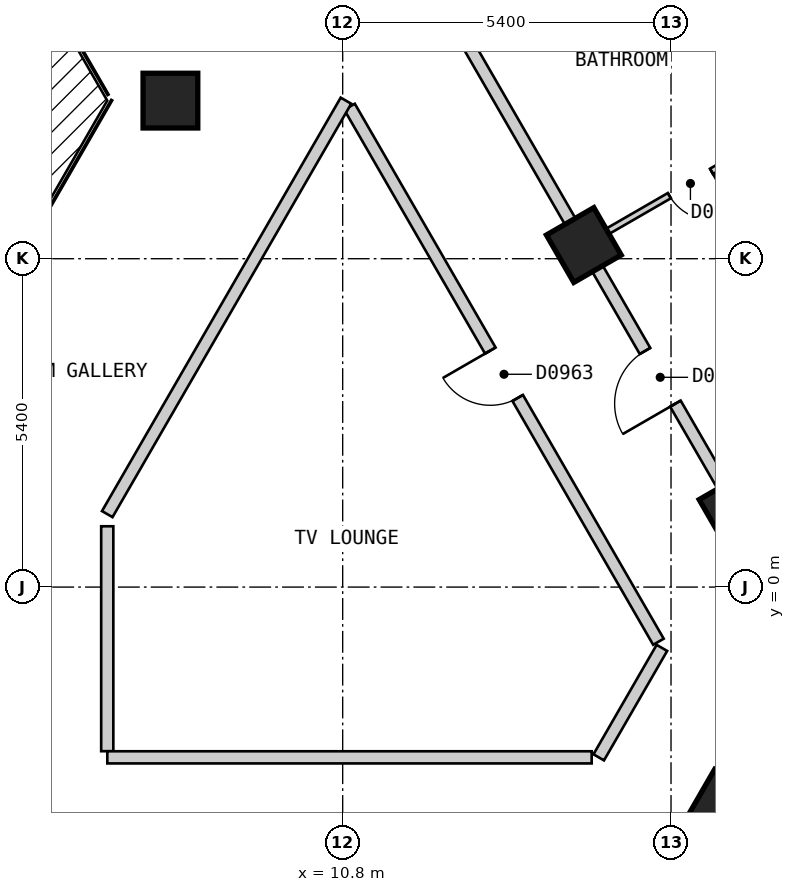
"""IFC4 building model, lengths in metres.
Left out: names, types, materials, properties, quantities, classifications, styles, units other than length and angle.
Written with IfcOpenShell. Run it as: python <this file> out.ifc"""

import sys

from ifc_helpers import new_model, si_unit, direction, frame, frame_2d, origin, origin_2d, place, context, subcontext, project, spatial, polyline, rectangle, outline, extrude, element, fill, save


model = new_model("IFC4")
c1 = context("Model", 3, precision=1e-05, world=origin(), true_north=direction((0.0, 1.0)))
c2 = subcontext(c1, "Body", "Model", "MODEL_VIEW")
j1 = project(units=[si_unit("LENGTHUNIT", "METRE"), si_unit("PLANEANGLEUNIT", "RADIAN")], contexts=[c1])
p1 = place(None, origin())
s1 = spatial("IfcSite", under=j1, at=p1, CompositionType="ELEMENT")
p2 = place(p1, origin())
s2 = spatial("IfcBuilding", under=s1, at=p2, CompositionType="ELEMENT")
p3 = place(p2, frame((0.0, 0.0, 90.0)))
s3 = spatial("IfcBuildingStorey", under=s2, at=p3, CompositionType="ELEMENT", Elevation=90.0)
for number, where, z_axis, x_axis in (
    (1, (17.083, -3.612, 0.0), (0.0, 0.0, 1.0), (0.5, 0.866, 0.0)),
    (2, (17.278, 1.274, 0.0), (0.0, 0.0, 1.0), (-0.5, 0.866, 0.0)),
    (3, (14.766, 5.625, 0.0), (0.0, 0.0, 1.0), (-0.5, 0.866, 0.0)),
    (4, (7.967, 8.0, 0.0), (0.0, 0.0, 1.0), (1.0, 0.0, 0.0)),
):
    element("IfcColumn", number, at=place(p3, frame(where, z_axis=z_axis, x_axis=x_axis)), inside=s3, PredefinedType="COLUMN", context=c2, shape_type="SweptSolid", body=[
        extrude(rectangle(XDim=0.9, YDim=0.9, at=origin_2d()), origin(), (0.0, 0.0, 1.0), 3.0),
    ])
p4 = place(p3, frame((29.027, 1.425, 0.0), z_axis=(0.0, 0.0, 1.0), x_axis=(-0.500027479704, 0.866009537788, 0.0)))
e5 = element("IfcWall", 5, at=p4, inside=s3, PredefinedType="SOLIDWALL", context=c2, shape_type="SweptSolid", body=[
    extrude(outline(polyline([(0.0, -0.15), (26.559, -0.15), (26.478, 0.15), (0.08, 0.15), (0.0, -0.15)])), origin(), (0.0, 0.0, 1.0), 2.7),
])
p5 = place(p4, frame((2.483, 0.0, 0.15)))
e6 = element("IfcOpeningElement", 6, at=p5, cuts=e5, PredefinedType="OPENING", context=c2, shape_type="SweptSolid", body=[
    extrude(rectangle(XDim=1.5, YDim=2.1, at=frame_2d((0.75, 1.05))), frame((0.0, 0.16, 0.0), z_axis=(0.0, -1.0, 0.0), x_axis=(1.0, 0.0, 0.0)), (0.0, 0.0, 1.0), 0.32),
])
p6 = place(p4, frame((7.506, 0.0, 0.15)))
e7 = element("IfcOpeningElement", 7, at=p6, cuts=e5, PredefinedType="OPENING", context=c2, shape_type="SweptSolid", body=[
    extrude(rectangle(XDim=1.5, YDim=2.1, at=frame_2d((0.75, 1.05))), frame((0.0, 0.16, 0.0), z_axis=(0.0, -1.0, 0.0), x_axis=(1.0, 0.0, 0.0)), (0.0, 0.0, 1.0), 0.32),
])
p7 = place(p4, frame((12.529, 0.0, 0.15)))
e8 = element("IfcOpeningElement", 8, at=p7, cuts=e5, PredefinedType="OPENING", context=c2, shape_type="SweptSolid", body=[
    extrude(rectangle(XDim=1.5, YDim=2.1, at=frame_2d((0.75, 1.05))), frame((0.0, 0.16, 0.0), z_axis=(0.0, -1.0, 0.0), x_axis=(1.0, 0.0, 0.0)), (0.0, 0.0, 1.0), 0.32),
])
p8 = place(p4, frame((17.552, 0.0, 0.15)))
e9 = element("IfcOpeningElement", 9, at=p8, cuts=e5, PredefinedType="OPENING", context=c2, shape_type="SweptSolid", body=[
    extrude(rectangle(XDim=1.5, YDim=2.1, at=frame_2d((0.75, 1.05))), frame((0.0, 0.16, 0.0), z_axis=(0.0, -1.0, 0.0), x_axis=(1.0, 0.0, 0.0)), (0.0, 0.0, 1.0), 0.32),
])
p9 = place(p4, frame((22.575, 0.0, 0.15)))
e10 = element("IfcOpeningElement", 10, at=p9, cuts=e5, PredefinedType="OPENING", context=c2, shape_type="SweptSolid", body=[
    extrude(rectangle(XDim=1.5, YDim=2.1, at=frame_2d((0.75, 1.05))), frame((0.0, 0.16, 0.0), z_axis=(0.0, -1.0, 0.0), x_axis=(1.0, 0.0, 0.0)), (0.0, 0.0, 1.0), 0.32),
])
p10 = place(p3, frame((10.913, 7.899, 0.0), z_axis=(0.0, 0.0, 1.0), x_axis=(0.500028940566, -0.866008694296, 0.0)))
e11 = element("IfcWall", 11, at=p10, inside=s3, PredefinedType="PARTITIONING", context=c2, shape_type="SweptSolid", body=[
    extrude(rectangle(XDim=10.159, YDim=0.2, at=frame_2d((5.08, 0.0))), origin(), (0.0, 0.0, 1.0), 2.7),
])
p11 = place(p10, frame((4.63, 0.0, 0.0)))
e12 = element("IfcOpeningElement", 12, at=p11, cuts=e11, PredefinedType="OPENING", context=c2, shape_type="SweptSolid", body=[
    extrude(rectangle(XDim=0.9, YDim=2.1, at=frame_2d((0.45, 1.05))), frame((0.0, 0.11, 0.0), z_axis=(0.0, -1.0, 0.0), x_axis=(1.0, 0.0, 0.0)), (0.0, 0.0, 1.0), 0.22),
])
p12 = place(p3, frame((8.488, 16.5, 0.0), z_axis=(0.0, 0.0, 1.0), x_axis=(0.499986836607, -0.86603300354, 0.0)))
e13 = element("IfcWall", 13, at=p12, inside=s3, PredefinedType="PARTITIONING", context=c2, shape_type="SweptSolid", body=[
    extrude(rectangle(XDim=20.09, YDim=0.2, at=frame_2d((10.045, 0.0))), origin(), (0.0, 0.0, 1.0), 2.7),
])
p13 = place(p12, frame((14.569, 0.0, 0.0)))
e14 = element("IfcOpeningElement", 14, at=p13, cuts=e13, PredefinedType="OPENING", context=c2, shape_type="SweptSolid", body=[
    extrude(rectangle(XDim=1.0, YDim=2.1, at=frame_2d((0.5, 1.05))), frame((0.0, 0.11, 0.0), z_axis=(0.0, -1.0, 0.0), x_axis=(1.0, 0.0, 0.0)), (0.0, 0.0, 1.0), 0.22),
])
p14 = place(p12, frame((4.547, 0.0, 0.0)))
e15 = element("IfcOpeningElement", 15, at=p14, cuts=e13, PredefinedType="OPENING", context=c2, shape_type="SweptSolid", body=[
    extrude(rectangle(XDim=1.0, YDim=2.1, at=frame_2d((0.5, 1.05))), frame((0.0, 0.11, 0.0), z_axis=(0.0, -1.0, 0.0), x_axis=(1.0, 0.0, 0.0)), (0.0, 0.0, 1.0), 0.22),
])
p15 = place(p3, frame((6.928, 1.0, 0.0), z_axis=(0.0, 0.0, 1.0), x_axis=(0.0, -1.0, 0.0)))
e16 = element("IfcWall", 16, at=p15, inside=s3, PredefinedType="PARTITIONING", context=c2, shape_type="SweptSolid", body=[
    extrude(rectangle(XDim=3.699, YDim=0.2, at=frame_2d((1.85, 0.0))), origin(), (0.0, 0.0, 1.0), 2.7),
])
p16 = place(p3, frame((6.929, -2.8, 0.0), z_axis=(0.0, 0.0, 1.0), x_axis=(1.0, 0.0, 0.0)))
e17 = element("IfcWall", 17, at=p16, inside=s3, PredefinedType="PARTITIONING", context=c2, shape_type="SweptSolid", body=[
    extrude(rectangle(XDim=7.966, YDim=0.2, at=frame_2d((3.983, 0.0))), origin(), (0.0, 0.0, 1.0), 2.7),
])
p17 = place(p3, frame((6.928, 1.2, 0.0), z_axis=(0.0, 0.0, 1.0), x_axis=(0.500055327065, 0.865993458332, 0.0)))
e18 = element("IfcWall", 18, at=p17, inside=s3, PredefinedType="PARTITIONING", context=c2, shape_type="SweptSolid", body=[
    extrude(rectangle(XDim=7.851, YDim=0.2, at=frame_2d((3.926, 0.0))), origin(), (0.0, 0.0, 1.0), 2.7),
])
p18 = place(p3, frame((15.011, -2.8, 0.0), z_axis=(0.0, 0.0, 1.0), x_axis=(0.499929208183, 0.866066271601, 0.0)))
e19 = element("IfcWall", 19, at=p18, inside=s3, PredefinedType="PARTITIONING", context=c2, shape_type="SweptSolid", body=[
    extrude(rectangle(XDim=2.078, YDim=0.2, at=frame_2d((1.039, 0.0))), origin(), (0.0, 0.0, 1.0), 2.7),
])
p19 = place(p3, frame((15.771, -5.884, 0.0), z_axis=(0.0, 0.0, 1.0), x_axis=(0.499939494019, 0.866060334111, 0.0)))
e20 = element("IfcWall", 20, at=p19, inside=s3, PredefinedType="PARTITIONING", context=c2, shape_type="SweptSolid", body=[
    extrude(rectangle(XDim=5.583, YDim=0.2, at=frame_2d((2.792, 0.0))), origin(), (0.0, 0.0, 1.0), 2.7),
])
p20 = place(p3, frame((14.853, 5.675, 0.0), z_axis=(0.0, 0.0, 1.0), x_axis=(0.865979019114, 0.500080332001, 0.0)))
e21 = element("IfcWall", 21, at=p20, inside=s3, PredefinedType="PARTITIONING", context=c2, shape_type="SweptSolid", body=[
    extrude(rectangle(XDim=3.897, YDim=0.1, at=frame_2d((1.949, 0.0))), origin(), (0.0, 0.0, 1.0), 2.7),
])
p21 = place(p20, frame((1.524, 0.0, 0.0)))
e22 = element("IfcOpeningElement", 22, at=p21, cuts=e21, PredefinedType="OPENING", context=c2, shape_type="SweptSolid", body=[
    extrude(rectangle(XDim=0.8, YDim=2.1, at=frame_2d((0.4, 1.05))), frame((0.0, 0.06, 0.0), z_axis=(0.0, -1.0, 0.0), x_axis=(1.0, 0.0, 0.0)), (0.0, 0.0, 1.0), 0.12),
])
p22 = place(p3, frame((15.759, 11.998, 0.0), z_axis=(0.0, 0.0, 1.0), x_axis=(0.500068444113, -0.865985883951, 0.0)))
e23 = element("IfcWall", 23, at=p22, inside=s3, PredefinedType="PARTITIONING", context=c2, shape_type="SweptSolid", body=[
    extrude(rectangle(XDim=9.997, YDim=0.1, at=frame_2d((4.998, 0.0))), origin(), (0.0, 0.0, 1.0), 2.7),
])
p23 = place(p22, frame((7.074, 0.0, 0.0)))
e24 = element("IfcOpeningElement", 24, at=p23, cuts=e23, PredefinedType="OPENING", context=c2, shape_type="SweptSolid", body=[
    extrude(rectangle(XDim=0.9, YDim=2.1, at=frame_2d((0.45, 1.05))), frame((0.0, 0.06, 0.0), z_axis=(0.0, -1.0, 0.0), x_axis=(1.0, 0.0, 0.0)), (0.0, 0.0, 1.0), 0.12),
])
p24 = place(p13, origin())
e25 = element("IfcDoor", 25, at=p24, inside=s3, OperationType="SINGLE_SWING_RIGHT", PredefinedType="DOOR", context=c2, shape_type="SweptSolid", body=[
    extrude(rectangle(XDim=1.0, YDim=2.1, at=frame_2d((0.5, 1.05))), frame((0.0, 0.025, 0.0), z_axis=(0.0, -1.0, 0.0), x_axis=(1.0, 0.0, 0.0)), (0.0, 0.0, 1.0), 0.05),
])
fill(e14, e25)
p25 = place(p21, origin())
e26 = element("IfcDoor", 26, at=p25, inside=s3, OperationType="SINGLE_SWING_RIGHT", PredefinedType="DOOR", context=c2, shape_type="SweptSolid", body=[
    extrude(rectangle(XDim=0.8, YDim=2.1, at=frame_2d((0.4, 1.05))), frame((0.0, 0.025, 0.0), z_axis=(0.0, -1.0, 0.0), x_axis=(1.0, 0.0, 0.0)), (0.0, 0.0, 1.0), 0.05),
])
fill(e22, e26)
p26 = place(p11, origin())
e27 = element("IfcDoor", 27, at=p26, inside=s3, OperationType="SINGLE_SWING_LEFT", PredefinedType="DOOR", context=c2, shape_type="SweptSolid", body=[
    extrude(rectangle(XDim=0.9, YDim=2.1, at=frame_2d((0.45, 1.05))), frame((0.0, 0.025, 0.0), z_axis=(0.0, -1.0, 0.0), x_axis=(1.0, 0.0, 0.0)), (0.0, 0.0, 1.0), 0.05),
])
fill(e12, e27)
save(model, sys.argv[1])
